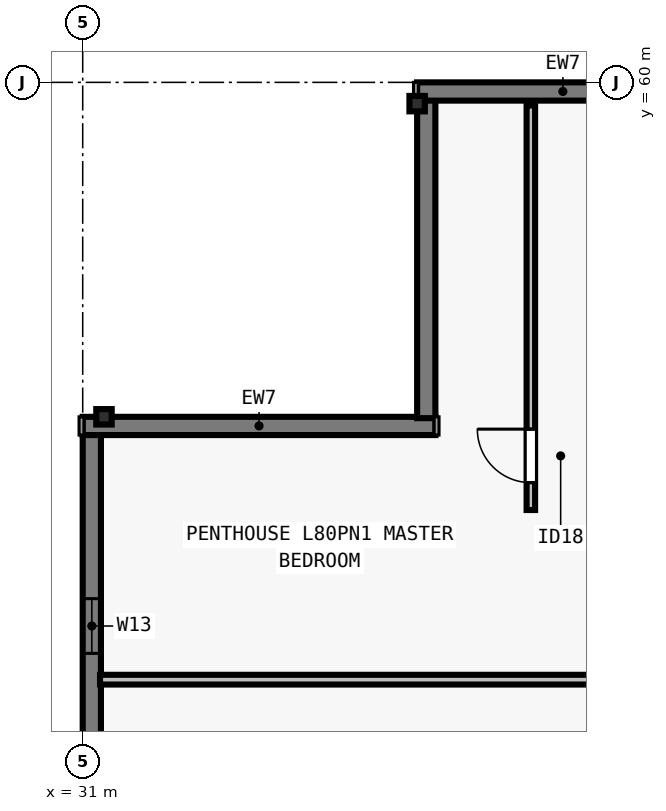
"""IFC4 building model, lengths in metres.
Left out: names, types, materials, properties, quantities, classifications, styles, units other than length and angle.
Written with IfcOpenShell. Run it as: python <this file> out.ifc"""

import sys

from ifc_helpers import new_model, si_unit, direction, frame, frame_2d, origin, origin_2d, place, context, subcontext, project, spatial, rectangle, i_section, extrude, element, fill, save


model = new_model("IFC4")
c1 = context("Model", 3, precision=1e-05, world=origin(), true_north=direction((0.0, 1.0)))
c2 = subcontext(c1, "Body", "Model", "MODEL_VIEW")
j1 = project(units=[si_unit("LENGTHUNIT", "METRE"), si_unit("PLANEANGLEUNIT", "RADIAN")], contexts=[c1])
p1 = place(None, origin())
s1 = spatial("IfcSite", under=j1, at=p1, CompositionType="ELEMENT")
p2 = place(p1, origin())
s2 = spatial("IfcBuilding", under=s1, at=p2, CompositionType="ELEMENT")
p3 = place(p2, frame((0.0, 0.0, 291.0)))
s3 = spatial("IfcBuildingStorey", under=s2, at=p3, CompositionType="ELEMENT", Elevation=291.0)
for number, where, z_axis, x_axis in (
    (1, (36.5, 59.65, 0.0), (0.0, 0.0, 1.0), (1.0, 0.0, 0.0)),
    (2, (31.35, 54.5, 0.0), (0.0, 0.0, 1.0), (0.0, 1.0, 0.0)),
):
    element("IfcColumn", number, at=place(p3, frame(where, z_axis=z_axis, x_axis=x_axis)), inside=s3, PredefinedType="COLUMN", context=c2, shape_type="SweptSolid", body=[
        extrude(i_section(OverallWidth=0.254, OverallDepth=0.254, WebThickness=0.009, FlangeThickness=0.014, FilletRadius=0.013, at=origin_2d()), origin(), (0.0, 0.0, 1.0), 3.5),
    ])
p4 = place(p3, frame((31.15, 23.5, 0.0), z_axis=(0.0, 0.0, 1.0), x_axis=(0.0, 1.0, 0.0)))
e3 = element("IfcWall", 3, at=p4, inside=s3, PredefinedType="SOLIDWALL", context=c2, shape_type="SweptSolid", body=[
    extrude(rectangle(XDim=30.722, YDim=0.3, at=frame_2d((15.361, 0.0))), origin(), (0.0, 0.0, 1.0), 3.29),
])
p5 = place(p4, frame((4.944, 0.0, 0.8)))
e4 = element("IfcOpeningElement", 4, at=p5, cuts=e3, PredefinedType="OPENING", context=c2, shape_type="SweptSolid", body=[
    extrude(rectangle(XDim=1.65, YDim=1.758, at=frame_2d((0.825, 0.879))), frame((0.0, 0.16, 0.0), z_axis=(0.0, -1.0, 0.0), x_axis=(1.0, 0.0, 0.0)), (0.0, 0.0, 1.0), 0.32),
])
p6 = place(p4, frame((7.355, 0.0, 0.8)))
e5 = element("IfcOpeningElement", 5, at=p6, cuts=e3, PredefinedType="OPENING", context=c2, shape_type="SweptSolid", body=[
    extrude(rectangle(XDim=2.0, YDim=1.758, at=frame_2d((1.0, 0.879))), frame((0.0, 0.16, 0.0), z_axis=(0.0, -1.0, 0.0), x_axis=(1.0, 0.0, 0.0)), (0.0, 0.0, 1.0), 0.32),
])
p7 = place(p4, frame((12.617, 0.0, 0.8)))
e6 = element("IfcOpeningElement", 6, at=p7, cuts=e3, PredefinedType="OPENING", context=c2, shape_type="SweptSolid", body=[
    extrude(rectangle(XDim=1.65, YDim=1.758, at=frame_2d((0.825, 0.879))), frame((0.0, 0.16, 0.0), z_axis=(0.0, -1.0, 0.0), x_axis=(1.0, 0.0, 0.0)), (0.0, 0.0, 1.0), 0.32),
])
p8 = place(p4, frame((16.28, 0.0, 0.8)))
e7 = element("IfcOpeningElement", 7, at=p8, cuts=e3, PredefinedType="OPENING", context=c2, shape_type="SweptSolid", body=[
    extrude(rectangle(XDim=2.0, YDim=1.758, at=frame_2d((1.0, 0.879))), frame((0.0, 0.16, 0.0), z_axis=(0.0, -1.0, 0.0), x_axis=(1.0, 0.0, 0.0)), (0.0, 0.0, 1.0), 0.32),
])
p9 = place(p4, frame((21.142, 0.0, 0.8)))
e8 = element("IfcOpeningElement", 8, at=p9, cuts=e3, PredefinedType="OPENING", context=c2, shape_type="SweptSolid", body=[
    extrude(rectangle(XDim=1.65, YDim=1.758, at=frame_2d((0.825, 0.879))), frame((0.0, 0.16, 0.0), z_axis=(0.0, -1.0, 0.0), x_axis=(1.0, 0.0, 0.0)), (0.0, 0.0, 1.0), 0.32),
])
p10 = place(p4, frame((27.11, 0.0, 0.8)))
e9 = element("IfcOpeningElement", 9, at=p10, cuts=e3, PredefinedType="OPENING", context=c2, shape_type="SweptSolid", body=[
    extrude(rectangle(XDim=0.9, YDim=1.75, at=frame_2d((0.45, 0.875))), frame((0.0, 0.16, 0.0), z_axis=(0.0, -1.0, 0.0), x_axis=(1.0, 0.0, 0.0)), (0.0, 0.0, 1.0), 0.32),
])
p11 = place(p3, frame((31.0, 54.35, 0.0), z_axis=(0.0, 0.0, 1.0), x_axis=(1.0, 0.0, 0.0)))
e10 = element("IfcWall", 10, at=p11, inside=s3, PredefinedType="SOLIDWALL", context=c2, shape_type="SweptSolid", body=[
    extrude(rectangle(XDim=5.8, YDim=0.3, at=frame_2d((2.9, 0.0))), origin(), (0.0, 0.0, 1.0), 3.29),
])
p12 = place(p3, frame((36.65, 54.478, 0.0), z_axis=(0.0, 0.0, 1.0), x_axis=(0.0, 1.0, 0.0)))
e11 = element("IfcWall", 11, at=p12, inside=s3, PredefinedType="SOLIDWALL", context=c2, shape_type="SweptSolid", body=[
    extrude(rectangle(XDim=5.244, YDim=0.3, at=frame_2d((2.622, 0.0))), origin(), (0.0, 0.0, 1.0), 3.29),
])
p13 = place(p3, frame((36.5, 59.85, 0.0), z_axis=(0.0, 0.0, 1.0), x_axis=(1.0, 0.0, 0.0)))
e12 = element("IfcWall", 12, at=p13, inside=s3, PredefinedType="SOLIDWALL", context=c2, shape_type="SweptSolid", body=[
    extrude(rectangle(XDim=30.722, YDim=0.3, at=frame_2d((15.361, 0.0))), origin(), (0.0, 0.0, 1.0), 3.29),
])
p14 = place(p13, frame((4.944, 0.0, 0.8)))
e13 = element("IfcOpeningElement", 13, at=p14, cuts=e12, PredefinedType="OPENING", context=c2, shape_type="SweptSolid", body=[
    extrude(rectangle(XDim=1.65, YDim=1.758, at=frame_2d((0.825, 0.879))), frame((0.0, 0.16, 0.0), z_axis=(0.0, -1.0, 0.0), x_axis=(1.0, 0.0, 0.0)), (0.0, 0.0, 1.0), 0.32),
])
p15 = place(p13, frame((7.756, 0.0, 0.8)))
e14 = element("IfcOpeningElement", 14, at=p15, cuts=e12, PredefinedType="OPENING", context=c2, shape_type="SweptSolid", body=[
    extrude(rectangle(XDim=2.0, YDim=1.758, at=frame_2d((1.0, 0.879))), frame((0.0, 0.16, 0.0), z_axis=(0.0, -1.0, 0.0), x_axis=(1.0, 0.0, 0.0)), (0.0, 0.0, 1.0), 0.32),
])
p16 = place(p13, frame((12.617, 0.0, 0.8)))
e15 = element("IfcOpeningElement", 15, at=p16, cuts=e12, PredefinedType="OPENING", context=c2, shape_type="SweptSolid", body=[
    extrude(rectangle(XDim=1.65, YDim=1.758, at=frame_2d((0.825, 0.879))), frame((0.0, 0.16, 0.0), z_axis=(0.0, -1.0, 0.0), x_axis=(1.0, 0.0, 0.0)), (0.0, 0.0, 1.0), 0.32),
])
p17 = place(p13, frame((17.53, 0.0, 0.8)))
e16 = element("IfcOpeningElement", 16, at=p17, cuts=e12, PredefinedType="OPENING", context=c2, shape_type="SweptSolid", body=[
    extrude(rectangle(XDim=2.0, YDim=1.758, at=frame_2d((1.0, 0.879))), frame((0.0, 0.16, 0.0), z_axis=(0.0, -1.0, 0.0), x_axis=(1.0, 0.0, 0.0)), (0.0, 0.0, 1.0), 0.32),
])
p18 = place(p13, frame((21.142, 0.0, 0.8)))
e17 = element("IfcOpeningElement", 17, at=p18, cuts=e12, PredefinedType="OPENING", context=c2, shape_type="SweptSolid", body=[
    extrude(rectangle(XDim=1.65, YDim=1.758, at=frame_2d((0.825, 0.879))), frame((0.0, 0.16, 0.0), z_axis=(0.0, -1.0, 0.0), x_axis=(1.0, 0.0, 0.0)), (0.0, 0.0, 1.0), 0.32),
])
p19 = place(p13, frame((23.954, 0.0, 0.8)))
e18 = element("IfcOpeningElement", 18, at=p19, cuts=e12, PredefinedType="OPENING", context=c2, shape_type="SweptSolid", body=[
    extrude(rectangle(XDim=2.0, YDim=1.758, at=frame_2d((1.0, 0.879))), frame((0.0, 0.16, 0.0), z_axis=(0.0, -1.0, 0.0), x_axis=(1.0, 0.0, 0.0)), (0.0, 0.0, 1.0), 0.32),
])
p20 = place(p3, frame((31.285, 50.177, 0.0), z_axis=(0.0, 0.0, 1.0), x_axis=(1.0, 0.0, 0.0)))
e19 = element("IfcWall", 19, at=p20, inside=s3, PredefinedType="PARTITIONING", context=c2, shape_type="SweptSolid", body=[
    extrude(rectangle(XDim=41.43, YDim=0.16, at=frame_2d((20.715, 0.0))), origin(), (0.0, 0.0, 1.0), 3.009),
])
p21 = place(p20, frame((20.235, 0.0, 0.0)))
e20 = element("IfcOpeningElement", 20, at=p21, cuts=e19, PredefinedType="OPENING", context=c2, shape_type="SweptSolid", body=[
    extrude(rectangle(XDim=0.96, YDim=2.18, at=frame_2d((0.48, 1.09))), frame((0.0, 0.09, 0.0), z_axis=(0.0, -1.0, 0.0), x_axis=(1.0, 0.0, 0.0)), (0.0, 0.0, 1.0), 0.18),
])
p22 = place(p3, frame((38.37, 52.968, 0.0), z_axis=(0.0, 0.0, 1.0), x_axis=(0.0, 1.0, 0.0)))
e21 = element("IfcWall", 21, at=p22, inside=s3, PredefinedType="PARTITIONING", context=c2, shape_type="SweptSolid", body=[
    extrude(rectangle(XDim=6.653, YDim=0.14, at=frame_2d((3.326, 0.0))), origin(), (0.0, 0.0, 1.0), 2.653),
])
p23 = place(p22, frame((0.45, 0.0, 0.0)))
e22 = element("IfcOpeningElement", 22, at=p23, cuts=e21, PredefinedType="OPENING", context=c2, shape_type="SweptSolid", body=[
    extrude(rectangle(XDim=0.88, YDim=2.1, at=frame_2d((0.44, 1.05))), frame((0.0, 0.08, 0.0), z_axis=(0.0, -1.0, 0.0), x_axis=(1.0, 0.0, 0.0)), (0.0, 0.0, 1.0), 0.16),
])
p24 = place(p10, origin())
e23 = element("IfcWindow", 23, at=p24, inside=s3, PartitioningType="SINGLE_PANEL", PredefinedType="WINDOW", context=c2, shape_type="SweptSolid", body=[
    extrude(rectangle(XDim=0.9, YDim=1.75, at=frame_2d((0.45, 0.875))), frame((0.0, -0.04, 0.0), z_axis=(0.0, -1.0, 0.0), x_axis=(1.0, 0.0, 0.0)), (0.0, 0.0, 1.0), 0.06),
])
fill(e9, e23)
p25 = place(p23, origin())
e24 = element("IfcDoor", 24, at=p25, inside=s3, OperationType="SINGLE_SWING_RIGHT", PredefinedType="DOOR", context=c2, shape_type="SweptSolid", body=[
    extrude(rectangle(XDim=0.88, YDim=2.1, at=frame_2d((0.44, 1.05))), frame((0.0, 0.025, 0.0), z_axis=(0.0, -1.0, 0.0), x_axis=(1.0, 0.0, 0.0)), (0.0, 0.0, 1.0), 0.05),
])
fill(e22, e24)
save(model, sys.argv[1])
